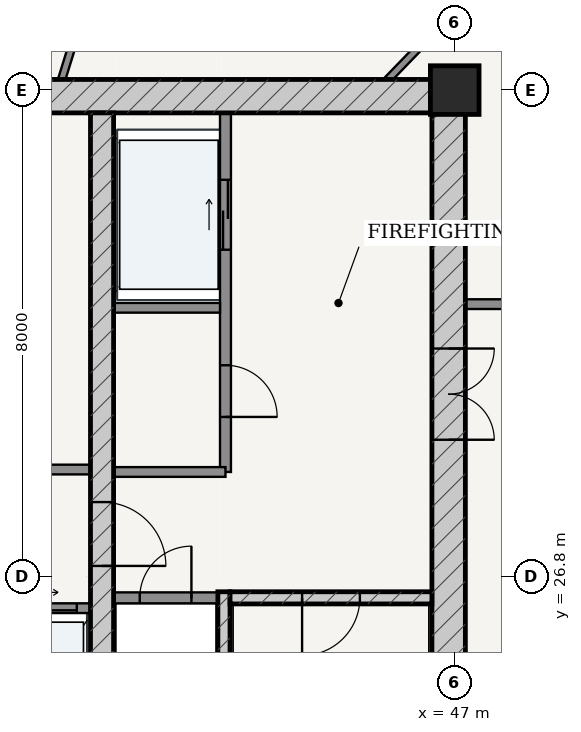
"""IFC4 building model, lengths in metres.
Left out: names, types, materials, properties, quantities, classifications, styles, units other than length and angle.
Written with IfcOpenShell. Run it as: python <this file> out.ifc"""

import sys

from ifc_helpers import new_model, si_unit, direction, frame, frame_2d, origin, origin_2d, place, context, subcontext, project, spatial, rectangle, extrude, source, transform, mapped, element, fill, save


model = new_model("IFC4")
c1 = context("Model", 3, precision=1e-05, world=origin(), true_north=direction((-0.2419218956, 0.970295726276)))
c2 = subcontext(c1, "Body", "Model", "MODEL_VIEW")
j1 = project(units=[si_unit("LENGTHUNIT", "METRE"), si_unit("PLANEANGLEUNIT", "RADIAN")], contexts=[c1])
p1 = place(None, origin())
s1 = spatial("IfcSite", under=j1, at=p1, CompositionType="ELEMENT")
p2 = place(p1, origin())
s2 = spatial("IfcBuilding", under=s1, at=p2, CompositionType="ELEMENT")
p3 = place(p2, frame((0.0, 0.0, 274.45)))
s3 = spatial("IfcBuildingStorey", under=s2, at=p3, CompositionType="ELEMENT", Elevation=274.45)
p4 = place(p3, frame((47.0, 34.8, 0.0), z_axis=(0.0, 0.0, 1.0), x_axis=(1.0, 0.0, 0.0)))
e1 = element("IfcColumn", 1, at=p4, inside=s3, PredefinedType="COLUMN", context=c2, shape_type="SweptSolid", body=[
    extrude(rectangle(XDim=0.8, YDim=0.8, at=origin_2d()), origin(), (0.0, 0.0, 1.0), 3.75),
])
p5 = place(p3, frame((28.825, 34.7, 0.0), z_axis=(0.0, 0.0, 1.0), x_axis=(1.0, 0.0, 0.0)))
e2 = element("IfcWall", 2, at=p5, inside=s3, PredefinedType="SHEAR", context=c2, shape_type="SweptSolid", body=[
    extrude(rectangle(XDim=18.35, YDim=0.55, at=frame_2d((9.175, 0.0))), origin(), (0.0, 0.0, 1.0), 3.49),
])
p6 = place(p3, frame((46.9, 19.175, 0.0), z_axis=(0.0, 0.0, 1.0), x_axis=(0.0, 1.0, 0.0)))
e3 = element("IfcWall", 3, at=p6, inside=s3, PredefinedType="SHEAR", context=c2, shape_type="SweptSolid", body=[
    extrude(rectangle(XDim=15.25, YDim=0.55, at=frame_2d((7.625, 0.0))), origin(), (0.0, 0.0, 1.0), 3.49),
])
p7 = place(p6, frame((9.875, 0.0, 0.0)))
e4 = element("IfcOpeningElement", 4, at=p7, cuts=e3, PredefinedType="OPENING", context=c2, shape_type="SweptSolid", body=[
    extrude(rectangle(XDim=1.5, YDim=2.2, at=frame_2d((0.75, 1.1))), frame((0.0, 0.285, 0.0), z_axis=(0.0, -1.0, 0.0), x_axis=(1.0, 0.0, 0.0)), (0.0, 0.0, 1.0), 0.57),
])
p8 = place(p3, frame((43.205, 19.175, 0.0), z_axis=(0.0, 0.0, 1.0), x_axis=(0.0, 1.0, 0.0)))
e5 = element("IfcWall", 5, at=p8, inside=s3, PredefinedType="SOLIDWALL", context=c2, shape_type="SweptSolid", body=[
    extrude(rectangle(XDim=7.375, YDim=0.2, at=frame_2d((3.688, 0.0))), origin(), (0.0, 0.0, 1.0), 3.49),
])
p9 = place(p3, frame((43.305, 26.45, 0.0), z_axis=(0.0, 0.0, 1.0), x_axis=(1.0, 0.0, 0.0)))
e6 = element("IfcWall", 6, at=p9, inside=s3, PredefinedType="SOLIDWALL", context=c2, shape_type="SweptSolid", body=[
    extrude(rectangle(XDim=3.32, YDim=0.2, at=frame_2d((1.66, 0.0))), origin(), (0.0, 0.0, 1.0), 3.49),
])
p10 = place(p9, frame((1.185, 0.0, 0.0)))
e7 = element("IfcOpeningElement", 7, at=p10, cuts=e6, PredefinedType="OPENING", context=c2, shape_type="SweptSolid", body=[
    extrude(rectangle(XDim=0.95, YDim=2.15, at=frame_2d((0.475, 1.075))), frame((0.0, 0.11, 0.0), z_axis=(0.0, -1.0, 0.0), x_axis=(1.0, 0.0, 0.0)), (0.0, 0.0, 1.0), 0.22),
])
p11 = place(p3, frame((41.2, 19.175, 0.0), z_axis=(0.0, 0.0, 1.0), x_axis=(0.0, 1.0, 0.0)))
e8 = element("IfcWall", 8, at=p11, inside=s3, PredefinedType="SHEAR", context=c2, shape_type="SweptSolid", body=[
    extrude(rectangle(XDim=15.25, YDim=0.38, at=frame_2d((7.625, 0.0))), origin(), (0.0, 0.0, 1.0), 3.49),
])
p12 = place(p11, frame((7.8, 0.0, 0.0)))
e9 = element("IfcOpeningElement", 9, at=p12, cuts=e8, PredefinedType="OPENING", context=c2, shape_type="SweptSolid", body=[
    extrude(rectangle(XDim=1.05, YDim=2.15, at=frame_2d((0.525, 1.075))), frame((0.0, 0.2, 0.0), z_axis=(0.0, -1.0, 0.0), x_axis=(1.0, 0.0, 0.0)), (0.0, 0.0, 1.0), 0.4),
])
p13 = place(p3, frame((41.39, 26.45, 0.0), z_axis=(0.0, 0.0, 1.0), x_axis=(1.0, 0.0, 0.0)))
e10 = element("IfcWall", 10, at=p13, inside=s3, PredefinedType="PARTITIONING", context=c2, shape_type="SweptSolid", body=[
    extrude(rectangle(XDim=1.71, YDim=0.18, at=frame_2d((0.855, 0.0))), origin(), (0.0, 0.0, 1.0), 3.49),
])
p14 = place(p13, frame((0.43, 0.0, 0.0)))
e11 = element("IfcOpeningElement", 11, at=p14, cuts=e10, PredefinedType="OPENING", context=c2, shape_type="SweptSolid", body=[
    extrude(rectangle(XDim=0.85, YDim=2.1, at=frame_2d((0.425, 1.05))), frame((0.0, 0.1, 0.0), z_axis=(0.0, -1.0, 0.0), x_axis=(1.0, 0.0, 0.0)), (0.0, 0.0, 1.0), 0.2),
])
p15 = place(p3, frame((43.23, 28.52, 0.0), z_axis=(0.0, 0.0, 1.0), x_axis=(0.0, 1.0, 0.0)))
e12 = element("IfcWall", 12, at=p15, inside=s3, PredefinedType="PARTITIONING", context=c2, shape_type="SweptSolid", body=[
    extrude(rectangle(XDim=5.905, YDim=0.18, at=frame_2d((2.953, 0.0))), origin(), (0.0, 0.0, 1.0), 3.49),
])
p16 = place(p15, frame((0.905, 0.0, 0.0)))
e13 = element("IfcOpeningElement", 13, at=p16, cuts=e12, PredefinedType="OPENING", context=c2, shape_type="SweptSolid", body=[
    extrude(rectangle(XDim=0.85, YDim=2.1, at=frame_2d((0.425, 1.05))), frame((0.0, 0.1, 0.0), z_axis=(0.0, -1.0, 0.0), x_axis=(1.0, 0.0, 0.0)), (0.0, 0.0, 1.0), 0.2),
])
p17 = place(p15, frame((3.655, 0.0, 0.0)))
e14 = element("IfcOpeningElement", 14, at=p17, cuts=e12, PredefinedType="OPENING", context=c2, shape_type="SweptSolid", body=[
    extrude(rectangle(XDim=1.15, YDim=2.2, at=frame_2d((0.575, 1.1))), frame((0.0, 0.1, 0.0), z_axis=(0.0, -1.0, 0.0), x_axis=(1.0, 0.0, 0.0)), (0.0, 0.0, 1.0), 0.2),
])
p18 = place(p3, frame((41.39, 31.22, 0.0), z_axis=(0.0, 0.0, 1.0), x_axis=(1.0, 0.0, 0.0)))
e15 = element("IfcWall", 15, at=p18, inside=s3, PredefinedType="PARTITIONING", context=c2, shape_type="SweptSolid", body=[
    extrude(rectangle(XDim=1.75, YDim=0.16, at=frame_2d((0.875, 0.0))), origin(), (0.0, 0.0, 1.0), 3.49),
])
p19 = place(p3, frame((41.39, 28.52, 0.0), z_axis=(0.0, 0.0, 1.0), x_axis=(1.0, 0.0, 0.0)))
e16 = element("IfcWall", 16, at=p19, inside=s3, PredefinedType="PARTITIONING", context=c2, shape_type="SweptSolid", body=[
    extrude(rectangle(XDim=1.84, YDim=0.16, at=frame_2d((0.92, 0.0))), origin(), (0.0, 0.0, 1.0), 3.49),
])
p20 = place(p3, frame((34.99, 28.56, 0.0), z_axis=(0.0, 0.0, 1.0), x_axis=(1.0, 0.0, 0.0)))
e17 = element("IfcWall", 17, at=p20, inside=s3, PredefinedType="PARTITIONING", context=c2, shape_type="SweptSolid", body=[
    extrude(rectangle(XDim=6.02, YDim=0.16, at=frame_2d((3.01, 0.0))), origin(), (0.0, 0.0, 1.0), 3.49),
])
p21 = place(p20, frame((1.025, 0.0, 0.0)))
e18 = element("IfcOpeningElement", 18, at=p21, cuts=e17, PredefinedType="OPENING", context=c2, shape_type="SweptSolid", body=[
    extrude(rectangle(XDim=0.86, YDim=2.1, at=frame_2d((0.43, 1.05))), frame((0.0, 0.09, 0.0), z_axis=(0.0, -1.0, 0.0), x_axis=(1.0, 0.0, 0.0)), (0.0, 0.0, 1.0), 0.18),
])
p22 = place(p20, frame((4.14, 0.0, 0.0)))
e19 = element("IfcOpeningElement", 19, at=p22, cuts=e17, PredefinedType="OPENING", context=c2, shape_type="SweptSolid", body=[
    extrude(rectangle(XDim=0.85, YDim=2.1, at=frame_2d((0.425, 1.05))), frame((0.0, 0.09, 0.0), z_axis=(0.0, -1.0, 0.0), x_axis=(1.0, 0.0, 0.0)), (0.0, 0.0, 1.0), 0.18),
])
p23 = place(p3, frame((34.99, 26.28, 0.0), z_axis=(0.0, 0.0, 1.0), x_axis=(1.0, 0.0, 0.0)))
e20 = element("IfcWall", 20, at=p23, inside=s3, PredefinedType="PARTITIONING", context=c2, shape_type="SweptSolid", body=[
    extrude(rectangle(XDim=6.02, YDim=0.16, at=frame_2d((3.01, 0.0))), origin(), (0.0, 0.0, 1.0), 3.49),
])
p24 = place(p23, frame((1.045, 0.0, 0.0)))
e21 = element("IfcOpeningElement", 21, at=p24, cuts=e20, PredefinedType="OPENING", context=c2, shape_type="SweptSolid", body=[
    extrude(rectangle(XDim=0.85, YDim=2.1, at=frame_2d((0.425, 1.05))), frame((0.0, 0.09, 0.0), z_axis=(0.0, -1.0, 0.0), x_axis=(1.0, 0.0, 0.0)), (0.0, 0.0, 1.0), 0.18),
])
p25 = place(p23, frame((3.215, 0.0, 0.0)))
e22 = element("IfcOpeningElement", 22, at=p25, cuts=e20, PredefinedType="OPENING", context=c2, shape_type="SweptSolid", body=[
    extrude(rectangle(XDim=1.1, YDim=2.2, at=frame_2d((0.55, 1.1))), frame((0.0, 0.09, 0.0), z_axis=(0.0, -1.0, 0.0), x_axis=(1.0, 0.0, 0.0)), (0.0, 0.0, 1.0), 0.18),
])
p26 = place(p23, frame((4.695, 0.0, 0.0)))
e23 = element("IfcOpeningElement", 23, at=p26, cuts=e20, PredefinedType="OPENING", context=c2, shape_type="SweptSolid", body=[
    extrude(rectangle(XDim=1.1, YDim=2.2, at=frame_2d((0.55, 1.1))), frame((0.0, 0.09, 0.0), z_axis=(0.0, -1.0, 0.0), x_axis=(1.0, 0.0, 0.0)), (0.0, 0.0, 1.0), 0.18),
])
p27 = place(p3, frame((47.175, 31.28, 0.0), z_axis=(0.0, 0.0, 1.0), x_axis=(1.0, 0.0, 0.0)))
e24 = element("IfcWall", 24, at=p27, inside=s3, PredefinedType="PARTITIONING", context=c2, shape_type="SweptSolid", body=[
    extrude(rectangle(XDim=1.93, YDim=0.16, at=frame_2d((0.965, 0.0))), origin(), (0.0, 0.0, 1.0), 3.49),
])
p28 = place(p3, frame((45.903, 34.976, 0.0), z_axis=(0.0, 0.0, 1.0), x_axis=(0.69497417129, 0.719034700999, 0.0)))
e25 = element("IfcWall", 25, at=p28, inside=s3, PredefinedType="PARTITIONING", context=c2, shape_type="SweptSolid", body=[
    extrude(rectangle(XDim=3.775, YDim=0.12, at=frame_2d((1.887, 0.0))), origin(), (0.0, 0.0, 1.0), 3.015),
])
p29 = place(p28, frame((1.437, 0.0, 0.0)))
e26 = element("IfcOpeningElement", 26, at=p29, cuts=e25, PredefinedType="OPENING", context=c2, shape_type="SweptSolid", body=[
    extrude(rectangle(XDim=0.9, YDim=2.15, at=frame_2d((0.45, 1.075))), frame((0.0, 0.07, 0.0), z_axis=(0.0, -1.0, 0.0), x_axis=(1.0, 0.0, 0.0)), (0.0, 0.0, 1.0), 0.14),
])
p30 = place(p3, frame((40.537, 34.977, 0.0), z_axis=(0.0, 0.0, 1.0), x_axis=(0.29633127961, 0.95508521752, 0.0)))
e27 = element("IfcWall", 27, at=p30, inside=s3, PredefinedType="PARTITIONING", context=c2, shape_type="SweptSolid", body=[
    extrude(rectangle(XDim=2.826, YDim=0.12, at=frame_2d((1.413, 0.0))), origin(), (0.0, 0.0, 1.0), 2.575),
])
p31 = place(p30, frame((0.963, 0.0, 0.0)))
e28 = element("IfcOpeningElement", 28, at=p31, cuts=e27, PredefinedType="OPENING", context=c2, shape_type="SweptSolid", body=[
    extrude(rectangle(XDim=0.9, YDim=2.15, at=frame_2d((0.45, 1.075))), frame((0.0, 0.07, 0.0), z_axis=(0.0, -1.0, 0.0), x_axis=(1.0, 0.0, 0.0)), (0.0, 0.0, 1.0), 0.14),
])
m1 = source(origin(), c2, "Body", "SweptSolid", [
    extrude(rectangle(XDim=1.5, YDim=2.2, at=frame_2d((0.75, 1.1))), frame((0.0, 0.025, 0.0), z_axis=(0.0, -1.0, 0.0), x_axis=(1.0, 0.0, 0.0)), (0.0, 0.0, 1.0), 0.05),
])
p32 = place(p7, frame((1.5, 0.0, 0.0), z_axis=(0.0, 0.0, 1.0), x_axis=(-1.0, 0.0, 0.0)))
e29 = element("IfcDoor", 29, at=p32, inside=s3, OperationType="DOUBLE_DOOR_SINGLE_SWING", PredefinedType="DOOR", context=c2, shape_type="MappedRepresentation", body=[
    mapped(m1, transform((0.0, 0.0, 0.0), scale=1.0)),
])
fill(e4, e29)
m2 = source(origin(), c2, "Body", "SweptSolid", [
    extrude(rectangle(XDim=1.05, YDim=2.15, at=frame_2d((0.525, 1.075))), frame((0.0, 0.025, 0.0), z_axis=(0.0, -1.0, 0.0), x_axis=(1.0, 0.0, 0.0)), (0.0, 0.0, 1.0), 0.05),
])
p33 = place(p12, frame((1.05, 0.0, 0.0), z_axis=(0.0, 0.0, 1.0), x_axis=(-1.0, 0.0, 0.0)))
e30 = element("IfcDoor", 30, at=p33, inside=s3, OperationType="SINGLE_SWING_RIGHT", PredefinedType="DOOR", context=c2, shape_type="MappedRepresentation", body=[
    mapped(m2, transform((0.0, 0.0, 0.0), scale=1.0)),
])
fill(e9, e30)
m3 = source(origin(), c2, "Body", "SweptSolid", [
    extrude(rectangle(XDim=0.95, YDim=2.15, at=frame_2d((0.475, 1.075))), frame((0.0, 0.025, 0.0), z_axis=(0.0, -1.0, 0.0), x_axis=(1.0, 0.0, 0.0)), (0.0, 0.0, 1.0), 0.05),
])
p34 = place(p10, frame((0.95, 0.0, 0.0), z_axis=(0.0, 0.0, 1.0), x_axis=(-1.0, 0.0, 0.0)))
e31 = element("IfcDoor", 31, at=p34, inside=s3, OperationType="SINGLE_SWING_RIGHT", PredefinedType="DOOR", context=c2, shape_type="MappedRepresentation", body=[
    mapped(m3, transform((0.0, 0.0, 0.0), scale=1.0)),
])
fill(e7, e31)
m4 = source(origin(), c2, "Body", "SweptSolid", [
    extrude(rectangle(XDim=0.85, YDim=2.1, at=frame_2d((0.425, 1.05))), frame((0.0, 0.025, 0.0), z_axis=(0.0, -1.0, 0.0), x_axis=(1.0, 0.0, 0.0)), (0.0, 0.0, 1.0), 0.05),
])
p35 = place(p14, origin())
e32 = element("IfcDoor", 32, at=p35, inside=s3, OperationType="SINGLE_SWING_RIGHT", PredefinedType="DOOR", context=c2, shape_type="MappedRepresentation", body=[
    mapped(m4, transform((0.0, 0.0, 0.0), scale=1.0)),
])
fill(e11, e32)
p36 = place(p16, frame((0.85, 0.0, 0.0), z_axis=(0.0, 0.0, 1.0), x_axis=(-1.0, 0.0, 0.0)))
e33 = element("IfcDoor", 33, at=p36, inside=s3, OperationType="SINGLE_SWING_RIGHT", PredefinedType="DOOR", context=c2, shape_type="MappedRepresentation", body=[
    mapped(m4, transform((0.0, 0.0, 0.0), scale=1.0)),
])
fill(e13, e33)
m5 = source(origin(), c2, "Body", "SweptSolid", [
    extrude(rectangle(XDim=1.15, YDim=2.2, at=frame_2d((0.575, 1.1))), frame((0.0, 0.025, 0.0), z_axis=(0.0, -1.0, 0.0), x_axis=(1.0, 0.0, 0.0)), (0.0, 0.0, 1.0), 0.05),
])
p37 = place(p17, origin())
e34 = element("IfcDoor", 34, at=p37, inside=s3, OperationType="DOUBLE_DOOR_SLIDING", PredefinedType="DOOR", context=c2, shape_type="MappedRepresentation", body=[
    mapped(m5, transform((0.0, 0.0, 0.0), scale=1.0)),
])
fill(e14, e34)
m6 = source(origin(), c2, "Body", "SweptSolid", [
    extrude(rectangle(XDim=1.1, YDim=2.2, at=frame_2d((0.55, 1.1))), frame((0.0, 0.025, 0.0), z_axis=(0.0, -1.0, 0.0), x_axis=(1.0, 0.0, 0.0)), (0.0, 0.0, 1.0), 0.05),
])
p38 = place(p26, origin())
e35 = element("IfcDoor", 35, at=p38, inside=s3, OperationType="DOUBLE_DOOR_SLIDING", PredefinedType="DOOR", context=c2, shape_type="MappedRepresentation", body=[
    mapped(m6, transform((0.0, 0.0, 0.0), scale=1.0)),
])
fill(e23, e35)
save(model, sys.argv[1])
